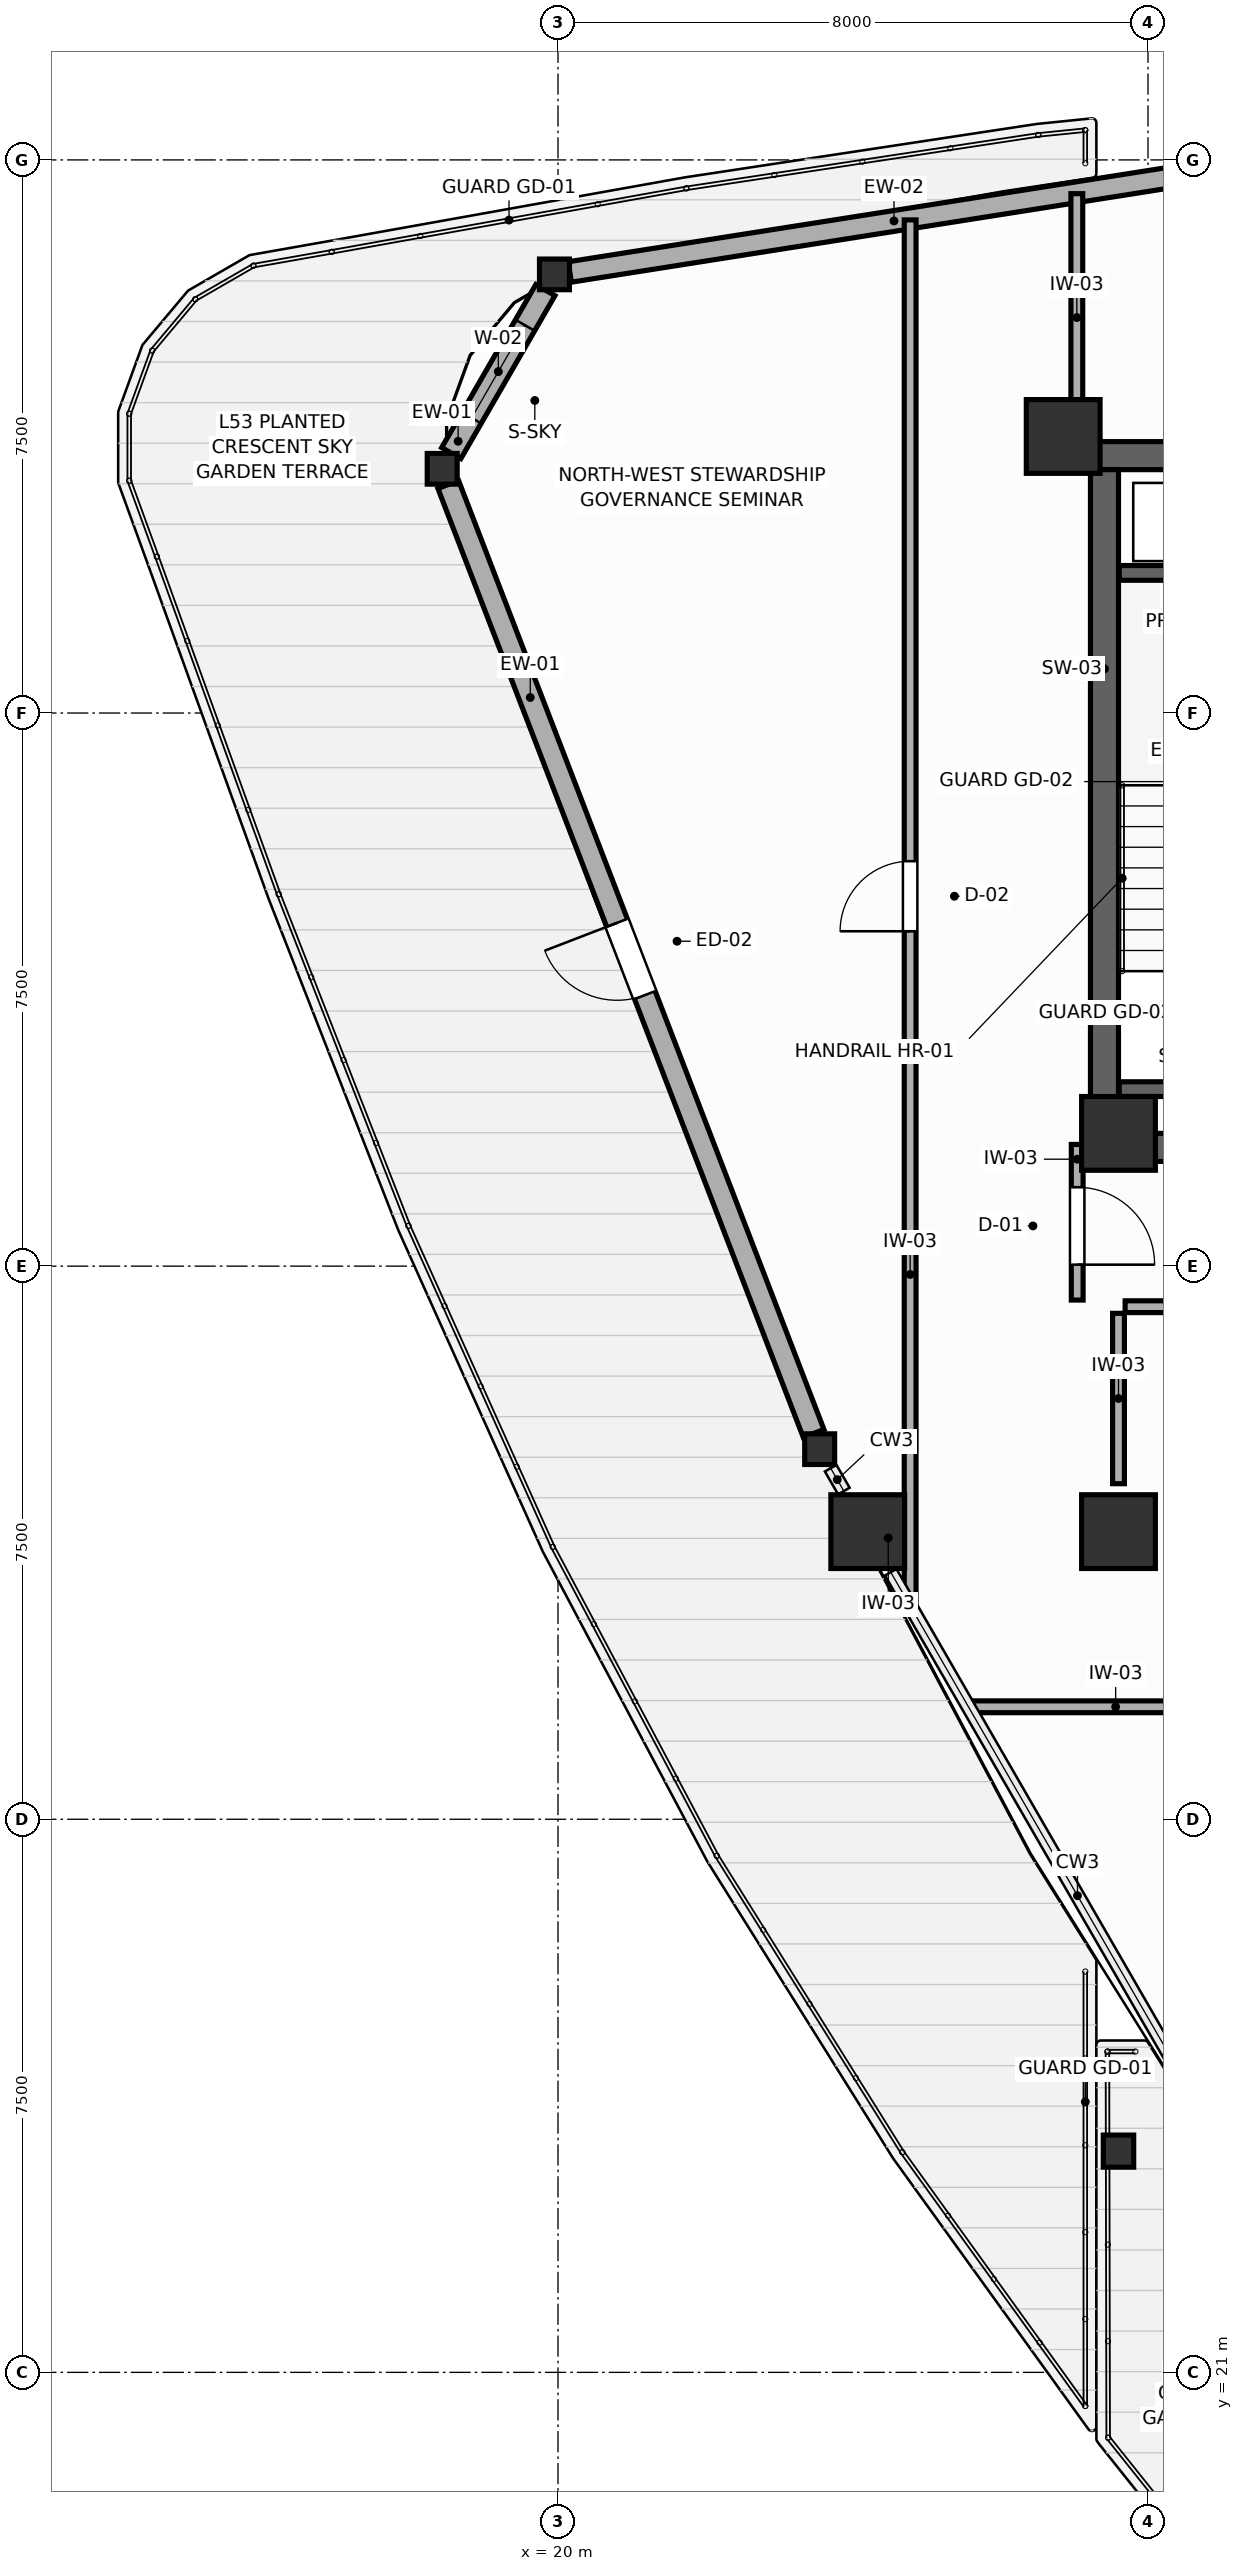
"""IFC4 building model, lengths in metres.
Left out: names, types, materials, properties, quantities, classifications, styles, units other than length and angle.
Written with IfcOpenShell. Run it as: python <this file> out.ifc"""

import sys

from ifc_helpers import new_model, si_unit, direction, frame, frame_2d, origin, origin_2d, place, context, subcontext, project, spatial, rectangle, i_section, extrude, source, transform, mapped, element, fill, save


model = new_model("IFC4")
c1 = context("Model", 3, precision=1e-05, world=origin(), true_north=direction((0.0, 1.0)))
c2 = subcontext(c1, "Body", "Model", "MODEL_VIEW")
j1 = project(units=[si_unit("LENGTHUNIT", "METRE"), si_unit("PLANEANGLEUNIT", "RADIAN")], contexts=[c1])
p1 = place(None, origin())
s1 = spatial("IfcSite", under=j1, at=p1, CompositionType="ELEMENT")
p2 = place(p1, origin())
s2 = spatial("IfcBuilding", under=s1, at=p2, CompositionType="ELEMENT")
p3 = place(p2, frame((0.0, 0.0, 205.8)))
s3 = spatial("IfcBuildingStorey", under=s2, at=p3, CompositionType="ELEMENT", Elevation=205.8)
p4 = place(p3, frame((27.22, 46.99, 0.0), z_axis=(0.0, 0.0, 1.0), x_axis=(1.0, 0.0, 0.0)))
e1 = element("IfcWall", 1, at=p4, inside=s3, PredefinedType="SHEAR", context=c2, shape_type="SweptSolid", body=[
    extrude(rectangle(XDim=17.56, YDim=0.38, at=frame_2d((8.78, 0.0))), origin(), (0.0, 0.0, 1.0), 3.6),
])
p5 = place(p3, frame((27.22, 37.61, 0.0), z_axis=(0.0, 0.0, 1.0), x_axis=(1.0, 0.0, 0.0)))
e2 = element("IfcWall", 2, at=p5, inside=s3, PredefinedType="SHEAR", context=c2, shape_type="SweptSolid", body=[
    extrude(rectangle(XDim=17.56, YDim=0.38, at=frame_2d((8.78, 0.0))), origin(), (0.0, 0.0, 1.0), 3.6),
])
p6 = place(p5, frame((4.805, 0.0, 0.0)))
e3 = element("IfcOpeningElement", 3, at=p6, cuts=e2, PredefinedType="OPENING", context=c2, shape_type="SweptSolid", body=[
    extrude(rectangle(XDim=1.05, YDim=2.1, at=frame_2d((0.525, 1.05))), frame((0.0, 0.2, 0.0), z_axis=(0.0, -1.0, 0.0), x_axis=(1.0, 0.0, 0.0)), (0.0, 0.0, 1.0), 0.4),
])
p7 = place(p5, frame((11.705, 0.0, 0.0)))
e4 = element("IfcOpeningElement", 4, at=p7, cuts=e2, PredefinedType="OPENING", context=c2, shape_type="SweptSolid", body=[
    extrude(rectangle(XDim=1.05, YDim=2.1, at=frame_2d((0.525, 1.05))), frame((0.0, 0.2, 0.0), z_axis=(0.0, -1.0, 0.0), x_axis=(1.0, 0.0, 0.0)), (0.0, 0.0, 1.0), 0.4),
])
p8 = place(p3, frame((27.41, 37.8, 0.0), z_axis=(0.0, 0.0, 1.0), x_axis=(0.0, 1.0, 0.0)))
e5 = element("IfcWall", 5, at=p8, inside=s3, PredefinedType="SHEAR", context=c2, shape_type="SweptSolid", body=[
    extrude(rectangle(XDim=9.0, YDim=0.38, at=frame_2d((4.5, 0.0))), origin(), (0.0, 0.0, 1.0), 3.6),
])
m1 = source(origin(), c2, "Body", "SweptSolid", [
    extrude(rectangle(XDim=1.0, YDim=1.0, at=origin_2d()), origin(), (0.0, 0.0, 1.0), 3.6),
])
for number, where, z_axis, x_axis in (
    (6, (26.85, 47.25, 0.0), (0.0, 0.0, 1.0), (1.0, 0.0, 0.0)),
    (7, (27.6, 37.8, 0.0), (0.0, 0.0, 1.0), (1.0, 0.0, 0.0)),
    (8, (27.6, 32.4, 0.0), (0.0, 0.0, 1.0), (1.0, 0.0, 0.0)),
    (9, (24.2, 32.4, 0.0), (0.0, 0.0, 1.0), (1.0, 0.0, 0.0)),
):
    element("IfcColumn", number, at=place(p3, frame(where, z_axis=z_axis, x_axis=x_axis)), inside=s3, PredefinedType="COLUMN", context=c2, shape_type="MappedRepresentation", body=[
        mapped(m1, transform((0.0, 0.0, 0.0), scale=1.0)),
    ])
m2 = source(origin(), c2, "Body", "SweptSolid", [
    extrude(i_section(OverallWidth=0.412, OverallDepth=0.435, WebThickness=0.033, FlangeThickness=0.053, FilletRadius=0.015, at=origin_2d()), origin(), (0.0, 0.0, 1.0), 3.6),
])
p9 = place(p3, frame((27.6, 24.0, 0.0), z_axis=(0.0, 0.0, 1.0), x_axis=(1.0, 0.0, 0.0)))
e10 = element("IfcColumn", 10, at=p9, inside=s3, PredefinedType="COLUMN", context=c2, shape_type="MappedRepresentation", body=[
    mapped(m2, transform((0.0, 0.0, 0.0), scale=1.0)),
])
m3 = source(origin(), c2, "Body", "SweptSolid", [
    extrude(i_section(OverallWidth=0.406, OverallDepth=0.416, WebThickness=0.027, FlangeThickness=0.044, FilletRadius=0.015, at=origin_2d()), origin(), (0.0, 0.0, 1.0), 3.6),
])
for number, where, z_axis, x_axis in (
    (11, (19.952, 49.448, 0.0), (0.0, 0.0, 1.0), (1.0, 0.0, 0.0)),
    (12, (18.43, 46.811, 0.0), (0.0, 0.0, 1.0), (1.0, 0.0, 0.0)),
    (13, (23.548, 33.518, 0.0), (0.0, 0.0, 1.0), (1.0, 0.0, 0.0)),
):
    element("IfcColumn", number, at=place(p3, frame(where, z_axis=z_axis, x_axis=x_axis)), inside=s3, PredefinedType="COLUMN", context=c2, shape_type="MappedRepresentation", body=[
        mapped(m3, transform((0.0, 0.0, 0.0), scale=1.0)),
    ])
p10 = place(p3, frame((33.815, 51.629, 0.0), z_axis=(0.0, 0.0, 1.0), x_axis=(-0.987848165878, -0.155422009936, 0.0)))
e14 = element("IfcWall", 14, at=p10, inside=s3, PredefinedType="SOLIDWALL", context=c2, shape_type="SweptSolid", body=[
    extrude(rectangle(XDim=13.823, YDim=0.28, at=frame_2d((6.912, 0.0))), origin(), (0.0, 0.0, 1.0), 2.96),
])
p11 = place(p10, frame((3.293, 0.0, 0.75)))
e15 = element("IfcOpeningElement", 15, at=p11, cuts=e14, PredefinedType="OPENING", context=c2, shape_type="SweptSolid", body=[
    extrude(rectangle(XDim=1.45, YDim=1.65, at=frame_2d((0.725, 0.825))), frame((0.0, 0.15, 0.0), z_axis=(0.0, -1.0, 0.0), x_axis=(1.0, 0.0, 0.0)), (0.0, 0.0, 1.0), 0.3),
])
p12 = place(p3, frame((19.829, 49.235, 0.0), z_axis=(0.0, 0.0, 1.0), x_axis=(-0.49990462644, -0.866080460733, 0.0)))
e16 = element("IfcWall", 16, at=p12, inside=s3, PredefinedType="SOLIDWALL", context=c2, shape_type="SweptSolid", body=[
    extrude(rectangle(XDim=2.552, YDim=0.3, at=frame_2d((1.276, 0.0))), origin(), (0.0, 0.0, 1.0), 3.02),
])
p13 = place(p12, frame((0.551, 0.0, 0.75)))
e17 = element("IfcOpeningElement", 17, at=p13, cuts=e16, PredefinedType="OPENING", context=c2, shape_type="SweptSolid", body=[
    extrude(rectangle(XDim=1.45, YDim=1.65, at=frame_2d((0.725, 0.825))), frame((0.0, 0.16, 0.0), z_axis=(0.0, -1.0, 0.0), x_axis=(1.0, 0.0, 0.0)), (0.0, 0.0, 1.0), 0.32),
])
p14 = place(p3, frame((18.512, 46.598, 0.0), z_axis=(0.0, 0.0, 1.0), x_axis=(0.359321962573, -0.933213655715, 0.0)))
e18 = element("IfcWall", 18, at=p14, inside=s3, PredefinedType="SOLIDWALL", context=c2, shape_type="SweptSolid", body=[
    extrude(rectangle(XDim=13.788, YDim=0.3, at=frame_2d((6.894, 0.0))), origin(), (0.0, 0.0, 1.0), 3.02),
])
p15 = place(p14, frame((6.369, 0.0, 0.0)))
e19 = element("IfcOpeningElement", 19, at=p15, cuts=e18, PredefinedType="OPENING", context=c2, shape_type="SweptSolid", body=[
    extrude(rectangle(XDim=1.05, YDim=2.1, at=frame_2d((0.525, 1.05))), frame((0.0, 0.16, 0.0), z_axis=(0.0, -1.0, 0.0), x_axis=(1.0, 0.0, 0.0)), (0.0, 0.0, 1.0), 0.32),
])
for number, where, z_axis, x_axis in (
    (20, (27.61, 45.4, 0.0), (0.0, 0.0, 1.0), (1.0, 0.0, 0.0)),
    (21, (27.61, 38.4, 0.0), (0.0, 0.0, 1.0), (1.0, 0.0, 0.0)),
):
    element("IfcWall", number, at=place(p3, frame(where, z_axis=z_axis, x_axis=x_axis)), inside=s3, PredefinedType="SHEAR", context=c2, shape_type="SweptSolid", body=[
        extrude(rectangle(XDim=3.14, YDim=0.2, at=frame_2d((1.57, 0.0))), origin(), (0.0, 0.0, 1.0), 3.6),
    ])
p16 = place(p3, frame((27.6, 33.05, 0.0), z_axis=(0.0, 0.0, 1.0), x_axis=(0.0, 1.0, 0.0)))
e22 = element("IfcWall", 22, at=p16, inside=s3, PredefinedType="PARTITIONING", context=c2, shape_type="SweptSolid", body=[
    extrude(rectangle(XDim=2.31, YDim=0.16, at=frame_2d((1.155, 0.0))), origin(), (0.0, 0.0, 1.0), 3.41),
])
p17 = place(p3, frame((27.69, 35.45, 0.0), z_axis=(0.0, 0.0, 1.0), x_axis=(1.0, 0.0, 0.0)))
e23 = element("IfcWall", 23, at=p17, inside=s3, PredefinedType="PARTITIONING", context=c2, shape_type="SweptSolid", body=[
    extrude(rectangle(XDim=4.03, YDim=0.16, at=frame_2d((2.015, 0.0))), origin(), (0.0, 0.0, 1.0), 3.41),
])
p18 = place(p17, frame((1.35, 0.0, 0.0)))
e24 = element("IfcOpeningElement", 24, at=p18, cuts=e23, PredefinedType="OPENING", context=c2, shape_type="SweptSolid", body=[
    extrude(rectangle(XDim=0.95, YDim=2.05, at=frame_2d((0.475, 1.025))), frame((0.0, 0.09, 0.0), z_axis=(0.0, -1.0, 0.0), x_axis=(1.0, 0.0, 0.0)), (0.0, 0.0, 1.0), 0.18),
])
p19 = place(p3, frame((27.04, 35.54, 0.0), z_axis=(0.0, 0.0, 1.0), x_axis=(0.0, 1.0, 0.0)))
e25 = element("IfcWall", 25, at=p19, inside=s3, PredefinedType="PARTITIONING", context=c2, shape_type="SweptSolid", body=[
    extrude(rectangle(XDim=2.11, YDim=0.16, at=frame_2d((1.055, 0.0))), origin(), (0.0, 0.0, 1.0), 3.41),
])
p20 = place(p19, frame((0.48, 0.0, 0.0)))
e26 = element("IfcOpeningElement", 26, at=p20, cuts=e25, PredefinedType="OPENING", context=c2, shape_type="SweptSolid", body=[
    extrude(rectangle(XDim=1.05, YDim=2.1, at=frame_2d((0.525, 1.05))), frame((0.0, 0.09, 0.0), z_axis=(0.0, -1.0, 0.0), x_axis=(1.0, 0.0, 0.0)), (0.0, 0.0, 1.0), 0.18),
])
p21 = place(p3, frame((24.775, 31.413, 0.0), z_axis=(0.0, 0.0, 1.0), x_axis=(0.0, 1.0, 0.0)))
e27 = element("IfcWall", 27, at=p21, inside=s3, PredefinedType="PARTITIONING", context=c2, shape_type="SweptSolid", body=[
    extrude(rectangle(XDim=18.773, YDim=0.16, at=frame_2d((9.387, 0.0))), origin(), (0.0, 0.0, 1.0), 3.41),
])
p22 = place(p21, frame((9.127, 0.0, 0.0)))
e28 = element("IfcOpeningElement", 28, at=p22, cuts=e27, PredefinedType="OPENING", context=c2, shape_type="SweptSolid", body=[
    extrude(rectangle(XDim=0.95, YDim=2.05, at=frame_2d((0.475, 1.025))), frame((0.0, 0.09, 0.0), z_axis=(0.0, -1.0, 0.0), x_axis=(1.0, 0.0, 0.0)), (0.0, 0.0, 1.0), 0.18),
])
p23 = place(p3, frame((25.585, 30.025, 0.0), z_axis=(0.0, 0.0, 1.0), x_axis=(1.0, 0.0, 0.0)))
e29 = element("IfcWall", 29, at=p23, inside=s3, PredefinedType="PARTITIONING", context=c2, shape_type="SweptSolid", body=[
    extrude(rectangle(XDim=11.108, YDim=0.16, at=frame_2d((5.554, 0.0))), origin(), (0.0, 0.0, 1.0), 3.41),
])
p24 = place(p23, frame((7.655, 0.0, 0.0)))
e30 = element("IfcOpeningElement", 30, at=p24, cuts=e29, PredefinedType="OPENING", context=c2, shape_type="SweptSolid", body=[
    extrude(rectangle(XDim=0.95, YDim=2.05, at=frame_2d((0.475, 1.025))), frame((0.0, 0.09, 0.0), z_axis=(0.0, -1.0, 0.0), x_axis=(1.0, 0.0, 0.0)), (0.0, 0.0, 1.0), 0.18),
])
p25 = place(p23, frame((4.132, 0.0, 0.0)))
e31 = element("IfcOpeningElement", 31, at=p25, cuts=e29, PredefinedType="OPENING", context=c2, shape_type="SweptSolid", body=[
    extrude(rectangle(XDim=0.95, YDim=2.05, at=frame_2d((0.475, 1.025))), frame((0.0, 0.09, 0.0), z_axis=(0.0, -1.0, 0.0), x_axis=(1.0, 0.0, 0.0)), (0.0, 0.0, 1.0), 0.18),
])
p26 = place(p3, frame((27.035, 47.183, 0.0), z_axis=(0.0, 0.0, 1.0), x_axis=(0.0, 1.0, 0.0)))
e32 = element("IfcWall", 32, at=p26, inside=s3, PredefinedType="PARTITIONING", context=c2, shape_type="SweptSolid", body=[
    extrude(rectangle(XDim=3.359, YDim=0.16, at=frame_2d((1.68, 0.0))), origin(), (0.0, 0.0, 1.0), 3.41),
])
p27 = place(p3, frame((24.263, 32.315, 0.0), z_axis=(0.0, 0.0, 1.0), x_axis=(1.0, 0.0, 0.0)))
e33 = element("IfcWall", 33, at=p27, inside=s3, PredefinedType="PARTITIONING", context=c2, shape_type="SweptSolid", body=[
    extrude(rectangle(XDim=0.43, YDim=0.16, at=frame_2d((0.215, 0.0))), origin(), (0.0, 0.0, 1.0), 2.96),
])
p28 = place(p13, origin())
e34 = element("IfcWindow", 34, at=p28, inside=s3, PartitioningType="SINGLE_PANEL", PredefinedType="WINDOW", context=c2, shape_type="SweptSolid", body=[
    extrude(rectangle(XDim=1.45, YDim=1.65, at=frame_2d((0.725, 0.825))), frame((0.0, 0.03, 0.0), z_axis=(0.0, -1.0, 0.0), x_axis=(1.0, 0.0, 0.0)), (0.0, 0.0, 1.0), 0.06),
])
fill(e17, e34)
p29 = place(p15, frame((1.05, 0.0, 0.0), z_axis=(0.0, 0.0, 1.0), x_axis=(-1.0, 0.0, 0.0)))
e35 = element("IfcDoor", 35, at=p29, inside=s3, OperationType="SINGLE_SWING_RIGHT", PredefinedType="DOOR", context=c2, shape_type="SweptSolid", body=[
    extrude(rectangle(XDim=1.05, YDim=2.1, at=frame_2d((0.525, 1.05))), frame((0.0, 0.025, 0.0), z_axis=(0.0, -1.0, 0.0), x_axis=(1.0, 0.0, 0.0)), (0.0, 0.0, 1.0), 0.05),
])
fill(e19, e35)
p30 = place(p20, frame((1.05, 0.0, 0.0), z_axis=(0.0, 0.0, 1.0), x_axis=(-1.0, 0.0, 0.0)))
e36 = element("IfcDoor", 36, at=p30, inside=s3, OperationType="SINGLE_SWING_RIGHT", PredefinedType="DOOR", context=c2, shape_type="SweptSolid", body=[
    extrude(rectangle(XDim=1.05, YDim=2.1, at=frame_2d((0.525, 1.05))), frame((0.0, 0.025, 0.0), z_axis=(0.0, -1.0, 0.0), x_axis=(1.0, 0.0, 0.0)), (0.0, 0.0, 1.0), 0.05),
])
fill(e26, e36)
p31 = place(p22, origin())
e37 = element("IfcDoor", 37, at=p31, inside=s3, OperationType="SINGLE_SWING_LEFT", PredefinedType="DOOR", context=c2, shape_type="SweptSolid", body=[
    extrude(rectangle(XDim=0.95, YDim=2.05, at=frame_2d((0.475, 1.025))), frame((0.0, 0.025, 0.0), z_axis=(0.0, -1.0, 0.0), x_axis=(1.0, 0.0, 0.0)), (0.0, 0.0, 1.0), 0.05),
])
fill(e28, e37)
save(model, sys.argv[1])
